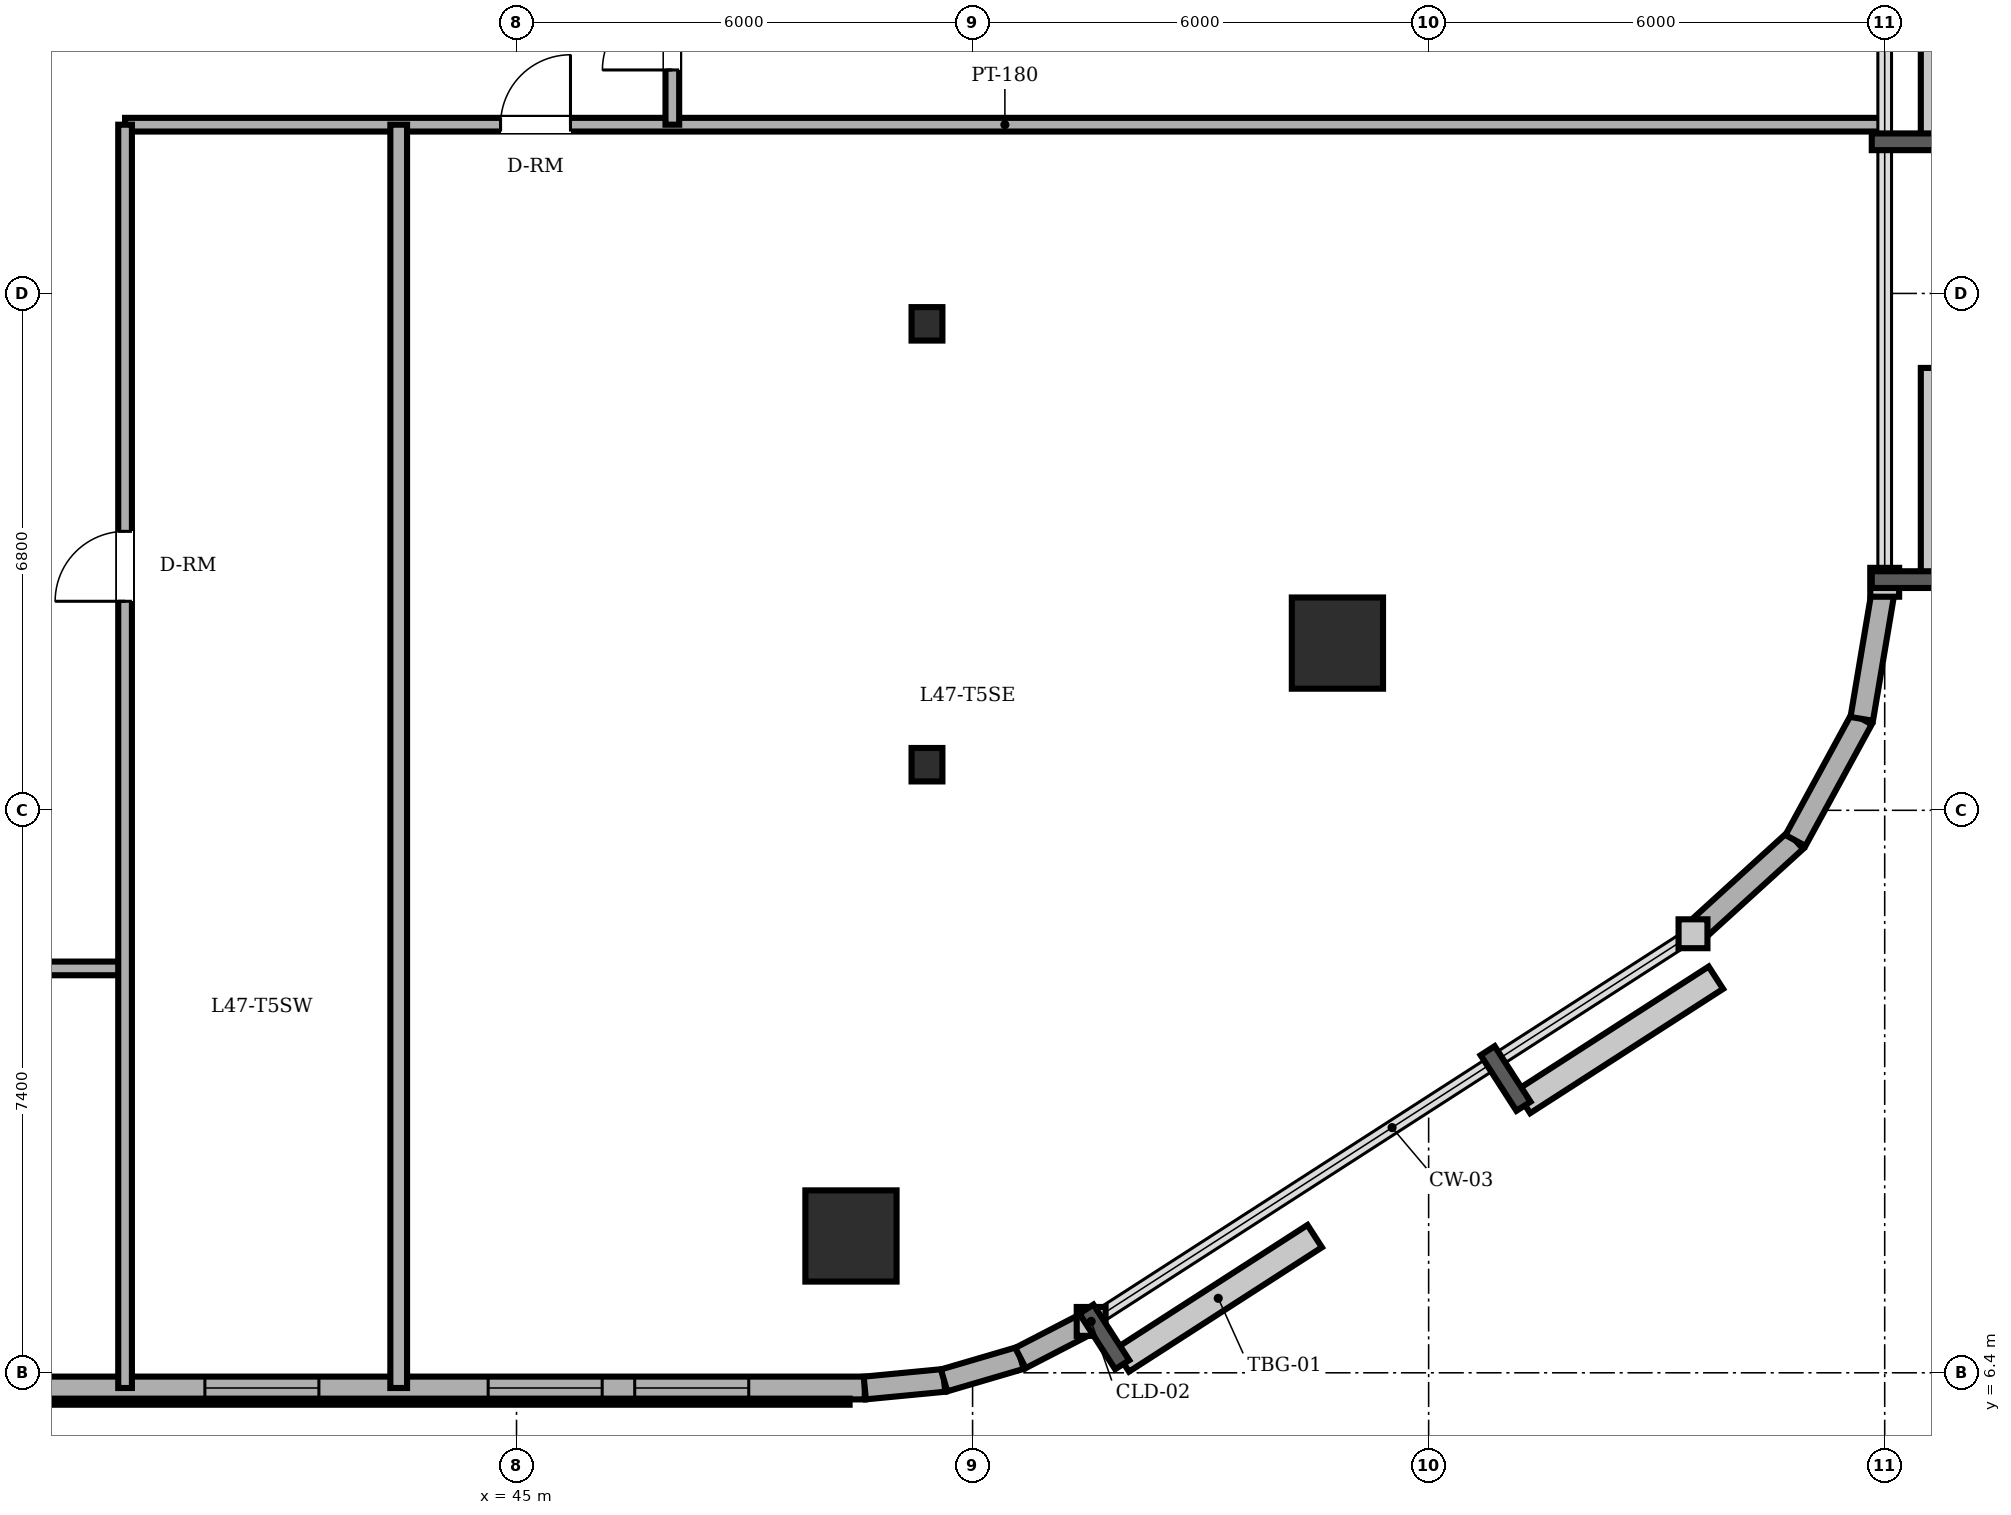
"""IFC4 building model, lengths in metres.
Left out: names, types, materials, properties, quantities, classifications, styles, units other than length and angle.
Written with IfcOpenShell. Run it as: python <this file> out.ifc"""

import sys

from ifc_helpers import new_model, si_unit, direction, frame, frame_2d, origin, origin_2d, place, context, subcontext, project, spatial, rectangle, circle, i_section, extrude, element, fill, save


model = new_model("IFC4")
c1 = context("Model", 3, precision=1e-05, world=origin(), true_north=direction((0.0, 1.0)))
c2 = subcontext(c1, "Body", "Model", "MODEL_VIEW")
j1 = project(units=[si_unit("LENGTHUNIT", "METRE"), si_unit("PLANEANGLEUNIT", "RADIAN")], contexts=[c1])
p1 = place(None, origin())
s1 = spatial("IfcSite", under=j1, at=p1, CompositionType="ELEMENT")
p2 = place(p1, origin())
s2 = spatial("IfcBuilding", under=s1, at=p2, CompositionType="ELEMENT")
p3 = place(p2, frame((0.0, 0.0, 179.8)))
s3 = spatial("IfcBuildingStorey", under=s2, at=p3, CompositionType="ELEMENT", Elevation=179.8)
for number, where, z_axis, x_axis in (
    (1, (49.4, 8.2, 0.0), (0.0, 0.0, 1.0), (1.0, 0.0, 0.0)),
    (2, (55.8, 16.0, 0.0), (0.0, 0.0, 1.0), (1.0, 0.0, 0.0)),
):
    element("IfcColumn", number, at=place(p3, frame(where, z_axis=z_axis, x_axis=x_axis)), inside=s3, PredefinedType="COLUMN", context=c2, shape_type="SweptSolid", body=[
        extrude(circle(Radius=0.6, at=origin_2d()), origin(), (0.0, 0.0, 1.0), 3.6),
    ])
for number, where, z_axis, x_axis in (
    (3, (50.4, 14.4, 0.0), (0.0, 0.0, 1.0), (1.0, 0.0, 0.0)),
    (4, (50.4, 20.2, 0.0), (0.0, 0.0, 1.0), (1.0, 0.0, 0.0)),
):
    element("IfcColumn", number, at=place(p3, frame(where, z_axis=z_axis, x_axis=x_axis)), inside=s3, PredefinedType="COLUMN", context=c2, shape_type="SweptSolid", body=[
        extrude(i_section(OverallWidth=0.406, OverallDepth=0.44, WebThickness=0.024, FlangeThickness=0.039, FilletRadius=0.015, at=origin_2d()), origin(), (0.0, 0.0, 1.0), 3.6),
    ])
p4 = place(p3, frame((19.3, 6.2, 0.0), z_axis=(0.0, 0.0, 1.0), x_axis=(1.0, 0.0, 0.0)))
e5 = element("IfcWall", 5, at=p4, inside=s3, PredefinedType="SOLIDWALL", context=c2, shape_type="SweptSolid", body=[
    extrude(rectangle(XDim=30.282, YDim=0.3, at=frame_2d((15.141, 0.0))), origin(), (0.0, 0.0, 1.0), 3.4),
])
p5 = place(p4, frame((5.725, 0.0, 0.0)))
e6 = element("IfcOpeningElement", 6, at=p5, cuts=e5, PredefinedType="OPENING", context=c2, shape_type="SweptSolid", body=[
    extrude(rectangle(XDim=0.95, YDim=2.2, at=frame_2d((0.475, 1.1))), frame((0.0, 0.16, 0.0), z_axis=(0.0, -1.0, 0.0), x_axis=(1.0, 0.0, 0.0)), (0.0, 0.0, 1.0), 0.32),
])
p6 = place(p4, frame((1.25, 0.0, 0.85)))
e7 = element("IfcOpeningElement", 7, at=p6, cuts=e5, PredefinedType="OPENING", context=c2, shape_type="SweptSolid", body=[
    extrude(rectangle(XDim=1.5, YDim=1.55, at=frame_2d((0.75, 0.775))), frame((0.0, 0.16, 0.0), z_axis=(0.0, -1.0, 0.0), x_axis=(1.0, 0.0, 0.0)), (0.0, 0.0, 1.0), 0.32),
])
p7 = place(p4, frame((2.9, 0.0, 0.85)))
e8 = element("IfcOpeningElement", 8, at=p7, cuts=e5, PredefinedType="OPENING", context=c2, shape_type="SweptSolid", body=[
    extrude(rectangle(XDim=1.5, YDim=1.55, at=frame_2d((0.75, 0.775))), frame((0.0, 0.16, 0.0), z_axis=(0.0, -1.0, 0.0), x_axis=(1.0, 0.0, 0.0)), (0.0, 0.0, 1.0), 0.32),
])
p8 = place(p4, frame((12.167, 0.0, 0.85)))
e9 = element("IfcOpeningElement", 9, at=p8, cuts=e5, PredefinedType="OPENING", context=c2, shape_type="SweptSolid", body=[
    extrude(rectangle(XDim=1.5, YDim=1.55, at=frame_2d((0.75, 0.775))), frame((0.0, 0.16, 0.0), z_axis=(0.0, -1.0, 0.0), x_axis=(1.0, 0.0, 0.0)), (0.0, 0.0, 1.0), 0.32),
])
p9 = place(p4, frame((15.983, 0.0, 0.85)))
e10 = element("IfcOpeningElement", 10, at=p9, cuts=e5, PredefinedType="OPENING", context=c2, shape_type="SweptSolid", body=[
    extrude(rectangle(XDim=1.5, YDim=1.55, at=frame_2d((0.75, 0.775))), frame((0.0, 0.16, 0.0), z_axis=(0.0, -1.0, 0.0), x_axis=(1.0, 0.0, 0.0)), (0.0, 0.0, 1.0), 0.32),
])
p10 = place(p4, frame((21.6, 0.0, 0.85)))
e11 = element("IfcOpeningElement", 11, at=p10, cuts=e5, PredefinedType="OPENING", context=c2, shape_type="SweptSolid", body=[
    extrude(rectangle(XDim=1.5, YDim=1.55, at=frame_2d((0.75, 0.775))), frame((0.0, 0.16, 0.0), z_axis=(0.0, -1.0, 0.0), x_axis=(1.0, 0.0, 0.0)), (0.0, 0.0, 1.0), 0.32),
])
p11 = place(p4, frame((25.327, 0.0, 0.85)))
e12 = element("IfcOpeningElement", 12, at=p11, cuts=e5, PredefinedType="OPENING", context=c2, shape_type="SweptSolid", body=[
    extrude(rectangle(XDim=1.5, YDim=1.55, at=frame_2d((0.75, 0.775))), frame((0.0, 0.16, 0.0), z_axis=(0.0, -1.0, 0.0), x_axis=(1.0, 0.0, 0.0)), (0.0, 0.0, 1.0), 0.32),
])
p12 = place(p4, frame((27.255, 0.0, 0.85)))
e13 = element("IfcOpeningElement", 13, at=p12, cuts=e5, PredefinedType="OPENING", context=c2, shape_type="SweptSolid", body=[
    extrude(rectangle(XDim=1.5, YDim=1.55, at=frame_2d((0.75, 0.775))), frame((0.0, 0.16, 0.0), z_axis=(0.0, -1.0, 0.0), x_axis=(1.0, 0.0, 0.0)), (0.0, 0.0, 1.0), 0.32),
])
p13 = place(p3, frame((49.582, 6.2, 0.0), z_axis=(0.0, 0.0, 1.0), x_axis=(0.995426089968, 0.095534807324, 0.0)))
e14 = element("IfcWall", 14, at=p13, inside=s3, PredefinedType="SOLIDWALL", context=c2, shape_type="SweptSolid", body=[
    extrude(rectangle(XDim=1.048, YDim=0.3, at=frame_2d((0.524, 0.0))), origin(), (0.0, 0.0, 1.0), 3.4),
])
p14 = place(p3, frame((50.625, 6.3, 0.0), z_axis=(0.0, 0.0, 1.0), x_axis=(0.959528674476, 0.281610942363, 0.0)))
e15 = element("IfcWall", 15, at=p14, inside=s3, PredefinedType="SOLIDWALL", context=c2, shape_type="SweptSolid", body=[
    extrude(rectangle(XDim=1.047, YDim=0.3, at=frame_2d((0.524, 0.0))), origin(), (0.0, 0.0, 1.0), 3.4),
])
p15 = place(p3, frame((51.63, 6.595, 0.0), z_axis=(0.0, 0.0, 1.0), x_axis=(0.888283247196, 0.459296062198, 0.0)))
e16 = element("IfcWall", 16, at=p15, inside=s3, PredefinedType="SOLIDWALL", context=c2, shape_type="SweptSolid", body=[
    extrude(rectangle(XDim=1.047, YDim=0.3, at=frame_2d((0.523, 0.0))), origin(), (0.0, 0.0, 1.0), 3.4),
])
p16 = place(p3, frame((60.478, 12.176, 0.0), z_axis=(0.0, 0.0, 1.0), x_axis=(0.73947929393, 0.673179302897, 0.0)))
e17 = element("IfcWall", 17, at=p16, inside=s3, PredefinedType="SOLIDWALL", context=c2, shape_type="SweptSolid", body=[
    extrude(rectangle(XDim=1.823, YDim=0.3, at=frame_2d((0.911, 0.0))), origin(), (0.0, 0.0, 1.0), 3.4),
])
p17 = place(p3, frame((61.826, 13.403, 0.0), z_axis=(0.0, 0.0, 1.0), x_axis=(0.478608030646, 0.878028674362, 0.0)))
e18 = element("IfcWall", 18, at=p17, inside=s3, PredefinedType="SOLIDWALL", context=c2, shape_type="SweptSolid", body=[
    extrude(rectangle(XDim=1.822, YDim=0.3, at=frame_2d((0.911, 0.0))), origin(), (0.0, 0.0, 1.0), 3.4),
])
p18 = place(p3, frame((62.698, 15.003, 0.0), z_axis=(0.0, 0.0, 1.0), x_axis=(0.165724081207, 0.986172159873, 0.0)))
e19 = element("IfcWall", 19, at=p18, inside=s3, PredefinedType="SOLIDWALL", context=c2, shape_type="SweptSolid", body=[
    extrude(rectangle(XDim=1.822, YDim=0.3, at=frame_2d((0.911, 0.0))), origin(), (0.0, 0.0, 1.0), 3.4),
])
p19 = place(p3, frame((13.8, 11.72, 0.0), z_axis=(0.0, 0.0, 1.0), x_axis=(1.0, 0.0, 0.0)))
e20 = element("IfcWall", 20, at=p19, inside=s3, PredefinedType="PARTITIONING", context=c2, shape_type="SweptSolid", body=[
    extrude(rectangle(XDim=26.05, YDim=0.18, at=frame_2d((13.025, 0.0))), origin(), (0.0, 0.0, 1.0), 3.4),
])
p20 = place(p19, frame((12.24, 0.0, 0.0)))
e21 = element("IfcOpeningElement", 21, at=p20, cuts=e20, PredefinedType="OPENING", context=c2, shape_type="SweptSolid", body=[
    extrude(rectangle(XDim=0.92, YDim=2.1, at=frame_2d((0.46, 1.05))), frame((0.0, 0.1, 0.0), z_axis=(0.0, -1.0, 0.0), x_axis=(1.0, 0.0, 0.0)), (0.0, 0.0, 1.0), 0.2),
])
p21 = place(p19, frame((5.54, 0.0, 0.0)))
e22 = element("IfcOpeningElement", 22, at=p21, cuts=e20, PredefinedType="OPENING", context=c2, shape_type="SweptSolid", body=[
    extrude(rectangle(XDim=0.92, YDim=2.1, at=frame_2d((0.46, 1.05))), frame((0.0, 0.1, 0.0), z_axis=(0.0, -1.0, 0.0), x_axis=(1.0, 0.0, 0.0)), (0.0, 0.0, 1.0), 0.2),
])
p22 = place(p19, frame((19.605, 0.0, 0.0)))
e23 = element("IfcOpeningElement", 23, at=p22, cuts=e20, PredefinedType="OPENING", context=c2, shape_type="SweptSolid", body=[
    extrude(rectangle(XDim=0.92, YDim=2.1, at=frame_2d((0.46, 1.05))), frame((0.0, 0.1, 0.0), z_axis=(0.0, -1.0, 0.0), x_axis=(1.0, 0.0, 0.0)), (0.0, 0.0, 1.0), 0.2),
])
p23 = place(p3, frame((39.85, 22.82, 0.0), z_axis=(0.0, 0.0, 1.0), x_axis=(1.0, 0.0, 0.0)))
e24 = element("IfcWall", 24, at=p23, inside=s3, PredefinedType="PARTITIONING", context=c2, shape_type="SweptSolid", body=[
    extrude(rectangle(XDim=23.15, YDim=0.18, at=frame_2d((11.575, 0.0))), origin(), (0.0, 0.0, 1.0), 3.4),
])
p24 = place(p23, frame((4.94, 0.0, 0.0)))
e25 = element("IfcOpeningElement", 25, at=p24, cuts=e24, PredefinedType="OPENING", context=c2, shape_type="SweptSolid", body=[
    extrude(rectangle(XDim=0.92, YDim=2.1, at=frame_2d((0.46, 1.05))), frame((0.0, 0.1, 0.0), z_axis=(0.0, -1.0, 0.0), x_axis=(1.0, 0.0, 0.0)), (0.0, 0.0, 1.0), 0.2),
])
p25 = place(p3, frame((39.85, 6.2, 0.0), z_axis=(0.0, 0.0, 1.0), x_axis=(0.0, 1.0, 0.0)))
e26 = element("IfcWall", 26, at=p25, inside=s3, PredefinedType="PARTITIONING", context=c2, shape_type="SweptSolid", body=[
    extrude(rectangle(XDim=16.62, YDim=0.18, at=frame_2d((8.31, 0.0))), origin(), (0.0, 0.0, 1.0), 3.4),
])
p26 = place(p25, frame((10.35, 0.0, 0.0)))
e27 = element("IfcOpeningElement", 27, at=p26, cuts=e26, PredefinedType="OPENING", context=c2, shape_type="SweptSolid", body=[
    extrude(rectangle(XDim=0.92, YDim=2.1, at=frame_2d((0.46, 1.05))), frame((0.0, 0.1, 0.0), z_axis=(0.0, -1.0, 0.0), x_axis=(1.0, 0.0, 0.0)), (0.0, 0.0, 1.0), 0.2),
])
p27 = place(p3, frame((43.45, 6.2, 0.0), z_axis=(0.0, 0.0, 1.0), x_axis=(0.0, 1.0, 0.0)))
e28 = element("IfcWall", 28, at=p27, inside=s3, PredefinedType="PARTITIONING", context=c2, shape_type="SweptSolid", body=[
    extrude(rectangle(XDim=16.62, YDim=0.22, at=frame_2d((8.31, 0.0))), origin(), (0.0, 0.0, 1.0), 3.4),
])
p28 = place(p3, frame((47.05, 22.82, 0.0), z_axis=(0.0, 0.0, 1.0), x_axis=(0.0, 1.0, 0.0)))
e29 = element("IfcWall", 29, at=p28, inside=s3, PredefinedType="PARTITIONING", context=c2, shape_type="SweptSolid", body=[
    extrude(rectangle(XDim=2.36, YDim=0.18, at=frame_2d((1.18, 0.0))), origin(), (0.0, 0.0, 1.0), 3.4),
])
p29 = place(p28, frame((0.72, 0.0, 0.0)))
e30 = element("IfcOpeningElement", 30, at=p29, cuts=e29, PredefinedType="OPENING", context=c2, shape_type="SweptSolid", body=[
    extrude(rectangle(XDim=0.92, YDim=2.1, at=frame_2d((0.46, 1.05))), frame((0.0, 0.1, 0.0), z_axis=(0.0, -1.0, 0.0), x_axis=(1.0, 0.0, 0.0)), (0.0, 0.0, 1.0), 0.2),
])
p30 = place(p10, origin())
e31 = element("IfcWindow", 31, at=p30, inside=s3, PartitioningType="DOUBLE_PANEL_VERTICAL", PredefinedType="WINDOW", context=c2, shape_type="SweptSolid", body=[
    extrude(rectangle(XDim=1.5, YDim=1.55, at=frame_2d((0.75, 0.775))), frame((0.0, 0.03, 0.0), z_axis=(0.0, -1.0, 0.0), x_axis=(1.0, 0.0, 0.0)), (0.0, 0.0, 1.0), 0.06),
])
fill(e11, e31)
p31 = place(p11, origin())
e32 = element("IfcWindow", 32, at=p31, inside=s3, PartitioningType="DOUBLE_PANEL_VERTICAL", PredefinedType="WINDOW", context=c2, shape_type="SweptSolid", body=[
    extrude(rectangle(XDim=1.5, YDim=1.55, at=frame_2d((0.75, 0.775))), frame((0.0, 0.03, 0.0), z_axis=(0.0, -1.0, 0.0), x_axis=(1.0, 0.0, 0.0)), (0.0, 0.0, 1.0), 0.06),
])
fill(e12, e32)
p32 = place(p12, origin())
e33 = element("IfcWindow", 33, at=p32, inside=s3, PartitioningType="DOUBLE_PANEL_VERTICAL", PredefinedType="WINDOW", context=c2, shape_type="SweptSolid", body=[
    extrude(rectangle(XDim=1.5, YDim=1.55, at=frame_2d((0.75, 0.775))), frame((0.0, 0.03, 0.0), z_axis=(0.0, -1.0, 0.0), x_axis=(1.0, 0.0, 0.0)), (0.0, 0.0, 1.0), 0.06),
])
fill(e13, e33)
p33 = place(p26, origin())
e34 = element("IfcDoor", 34, at=p33, inside=s3, OperationType="SINGLE_SWING_LEFT", PredefinedType="DOOR", context=c2, shape_type="SweptSolid", body=[
    extrude(rectangle(XDim=0.92, YDim=2.1, at=frame_2d((0.46, 1.05))), frame((0.0, 0.025, 0.0), z_axis=(0.0, -1.0, 0.0), x_axis=(1.0, 0.0, 0.0)), (0.0, 0.0, 1.0), 0.05),
])
fill(e27, e34)
p34 = place(p29, origin())
e35 = element("IfcDoor", 35, at=p34, inside=s3, OperationType="SINGLE_SWING_LEFT", PredefinedType="DOOR", context=c2, shape_type="SweptSolid", body=[
    extrude(rectangle(XDim=0.92, YDim=2.1, at=frame_2d((0.46, 1.05))), frame((0.0, 0.025, 0.0), z_axis=(0.0, -1.0, 0.0), x_axis=(1.0, 0.0, 0.0)), (0.0, 0.0, 1.0), 0.05),
])
fill(e30, e35)
p35 = place(p24, origin())
e36 = element("IfcDoor", 36, at=p35, inside=s3, OperationType="SINGLE_SWING_RIGHT", PredefinedType="DOOR", context=c2, shape_type="SweptSolid", body=[
    extrude(rectangle(XDim=0.92, YDim=2.1, at=frame_2d((0.46, 1.05))), frame((0.0, 0.025, 0.0), z_axis=(0.0, -1.0, 0.0), x_axis=(1.0, 0.0, 0.0)), (0.0, 0.0, 1.0), 0.05),
])
fill(e25, e36)
save(model, sys.argv[1])
